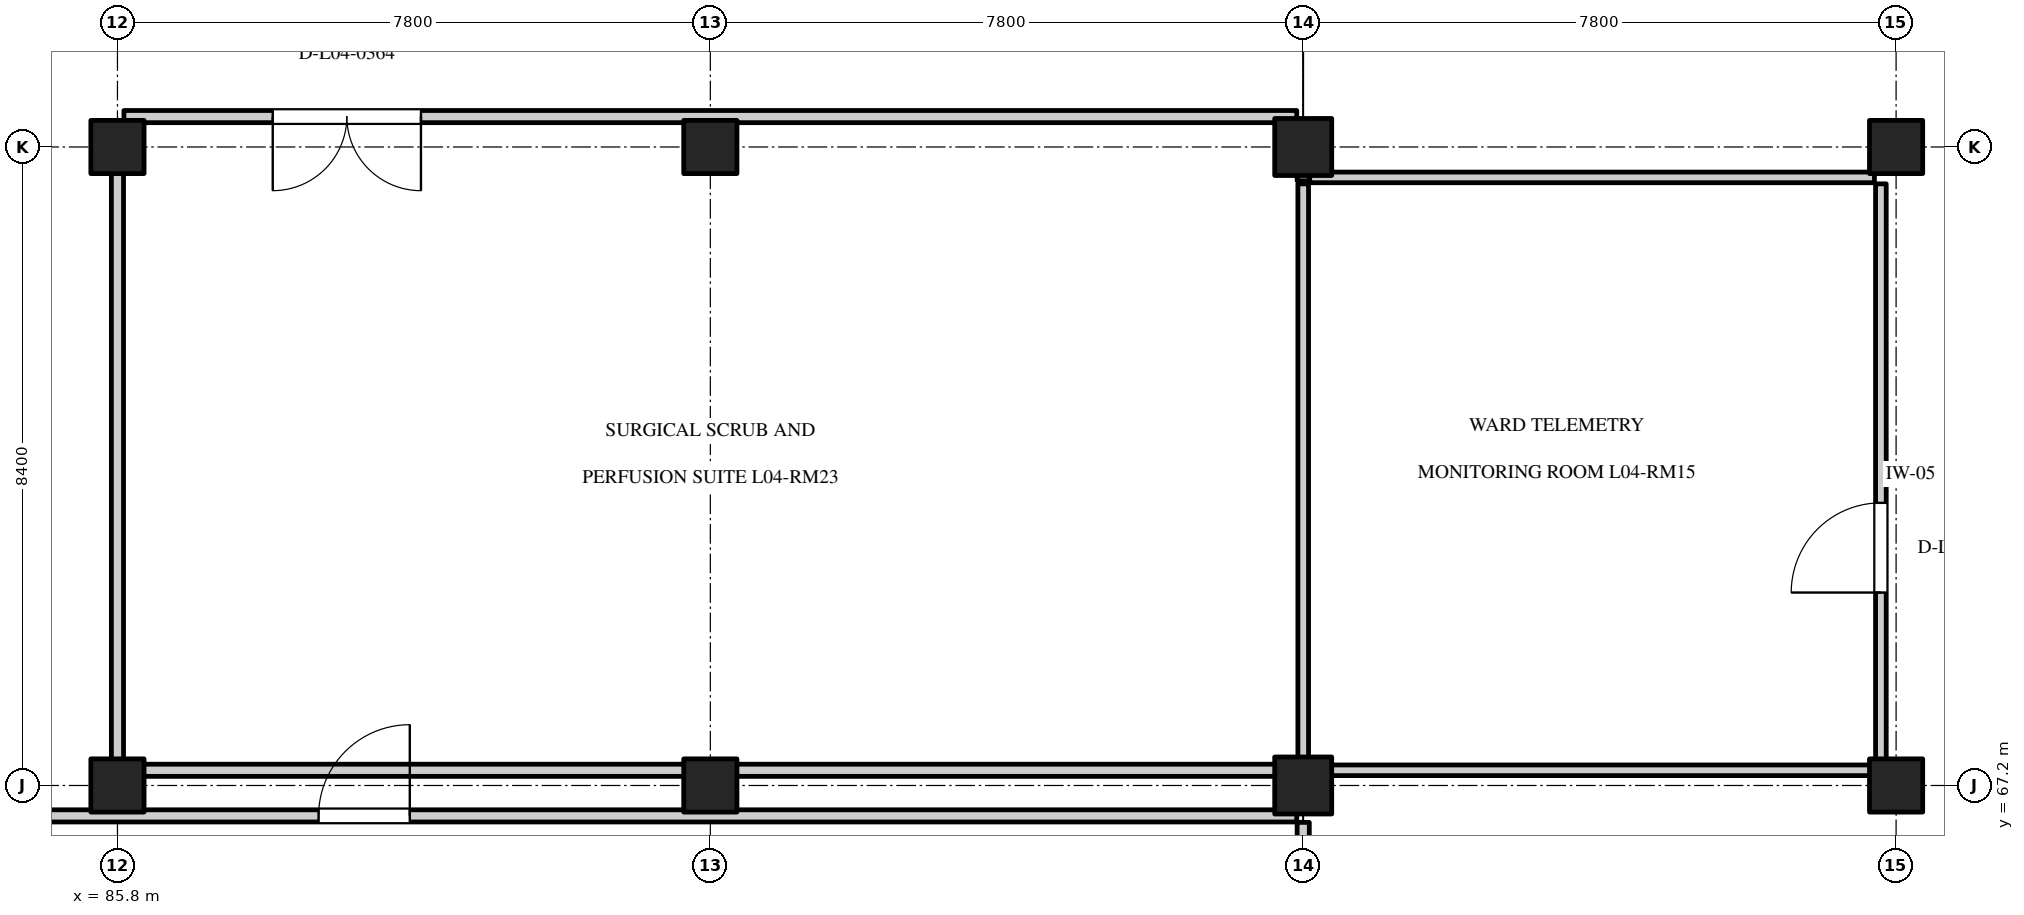
"""IFC4 building model, lengths in metres.
Left out: names, types, materials, properties, quantities, classifications, styles, units other than length and angle.
Written with IfcOpenShell. Run it as: python <this file> out.ifc"""

import sys

from ifc_helpers import new_model, si_unit, direction, frame, frame_2d, origin, origin_2d, place, context, subcontext, project, spatial, rectangle, extrude, element, fill, save


model = new_model("IFC4")
c1 = context("Model", 3, precision=1e-05, world=origin(), true_north=direction((0.0, 1.0)))
c2 = subcontext(c1, "Body", "Model", "MODEL_VIEW")
j1 = project(units=[si_unit("LENGTHUNIT", "METRE"), si_unit("PLANEANGLEUNIT", "RADIAN")], contexts=[c1])
p1 = place(None, origin())
s1 = spatial("IfcSite", under=j1, at=p1, CompositionType="ELEMENT")
p2 = place(p1, origin())
s2 = spatial("IfcBuilding", under=s1, at=p2, CompositionType="ELEMENT")
p3 = place(p2, frame((0.0, 0.0, 18.0)))
s3 = spatial("IfcBuildingStorey", under=s2, at=p3, CompositionType="ELEMENT", Elevation=18.0)
for number, where, z_axis, x_axis in (
    (1, (85.8, 67.2, 0.0), (0.0, 0.0, 1.0), (1.0, 0.0, 0.0)),
    (2, (85.8, 75.6, 0.0), (0.0, 0.0, 1.0), (1.0, 0.0, 0.0)),
    (3, (93.6, 67.2, 0.0), (0.0, 0.0, 1.0), (1.0, 0.0, 0.0)),
    (4, (93.6, 75.6, 0.0), (0.0, 0.0, 1.0), (1.0, 0.0, 0.0)),
):
    element("IfcColumn", number, at=place(p3, frame(where, z_axis=z_axis, x_axis=x_axis)), inside=s3, PredefinedType="COLUMN", context=c2, shape_type="SweptSolid", body=[
        extrude(rectangle(XDim=0.7, YDim=0.7, at=origin_2d()), origin(), (0.0, 0.0, 1.0), 4.2),
    ])
for number, where, z_axis, x_axis in (
    (5, (101.4, 67.2, 0.0), (0.0, 0.0, 1.0), (1.0, 0.0, 0.0)),
    (6, (101.4, 75.6, 0.0), (0.0, 0.0, 1.0), (1.0, 0.0, 0.0)),
):
    element("IfcColumn", number, at=place(p3, frame(where, z_axis=z_axis, x_axis=x_axis)), inside=s3, PredefinedType="COLUMN", context=c2, shape_type="SweptSolid", body=[
        extrude(rectangle(XDim=0.75, YDim=0.75, at=origin_2d()), origin(), (0.0, 0.0, 1.0), 4.2),
    ])
for number, where, z_axis, x_axis in (
    (7, (109.2, 67.2, 0.0), (0.0, 0.0, 1.0), (1.0, 0.0, 0.0)),
    (8, (109.2, 75.6, 0.0), (0.0, 0.0, 1.0), (1.0, 0.0, 0.0)),
):
    element("IfcColumn", number, at=place(p3, frame(where, z_axis=z_axis, x_axis=x_axis)), inside=s3, PredefinedType="COLUMN", context=c2, shape_type="SweptSolid", body=[
        extrude(rectangle(XDim=0.7, YDim=0.7, at=origin_2d()), origin(), (0.0, 0.0, 1.0), 4.2),
    ])
p4 = place(p3, frame((109.0, 67.485, 0.0), z_axis=(0.0, 0.0, 1.0), x_axis=(0.0, 1.0, 0.0)))
e9 = element("IfcWall", 9, at=p4, inside=s3, PredefinedType="PARTITIONING", context=c2, shape_type="SweptSolid", body=[
    extrude(rectangle(XDim=7.63, YDim=0.14, at=frame_2d((3.815, 0.0))), origin(), (0.0, 0.0, 1.0), 3.865),
])
p5 = place(p4, frame((2.253, 0.0, 0.0)))
e10 = element("IfcOpeningElement", 10, at=p5, cuts=e9, PredefinedType="OPENING", context=c2, shape_type="SweptSolid", body=[
    extrude(rectangle(XDim=1.18, YDim=2.2, at=frame_2d((0.59, 1.1))), frame((0.0, 0.082, 0.0), z_axis=(0.0, -1.0, 0.0), x_axis=(1.0, 0.0, 0.0)), (0.0, 0.0, 1.0), 0.164),
])
p6 = place(p3, frame((101.485, 67.4, 0.0), z_axis=(0.0, 0.0, 1.0), x_axis=(1.0, 0.0, 0.0)))
e11 = element("IfcWall", 11, at=p6, inside=s3, PredefinedType="PARTITIONING", context=c2, shape_type="SweptSolid", body=[
    extrude(rectangle(XDim=7.43, YDim=0.14, at=frame_2d((3.715, 0.0))), origin(), (0.0, 0.0, 1.0), 3.865),
])
p7 = place(p3, frame((101.485, 75.2, 0.0), z_axis=(0.0, 0.0, 1.0), x_axis=(1.0, 0.0, 0.0)))
e12 = element("IfcWall", 12, at=p7, inside=s3, PredefinedType="PARTITIONING", context=c2, shape_type="SweptSolid", body=[
    extrude(rectangle(XDim=7.43, YDim=0.14, at=frame_2d((3.715, 0.0))), origin(), (0.0, 0.0, 1.0), 3.385),
])
p8 = place(p3, frame((101.4, 67.485, 0.0), z_axis=(0.0, 0.0, 1.0), x_axis=(0.0, 1.0, 0.0)))
e13 = element("IfcWall", 13, at=p8, inside=s3, PredefinedType="PARTITIONING", context=c2, shape_type="SweptSolid", body=[
    extrude(rectangle(XDim=7.63, YDim=0.14, at=frame_2d((3.815, 0.0))), origin(), (0.0, 0.0, 1.0), 3.235),
])
p9 = place(p3, frame((85.885, 76.0, 0.0), z_axis=(0.0, 0.0, 1.0), x_axis=(1.0, 0.0, 0.0)))
e14 = element("IfcWall", 14, at=p9, inside=s3, PredefinedType="PARTITIONING", context=c2, shape_type="SweptSolid", body=[
    extrude(rectangle(XDim=15.43, YDim=0.16, at=frame_2d((7.715, 0.0))), origin(), (0.0, 0.0, 1.0), 3.385),
])
p10 = place(p9, frame((1.958, 0.0, 0.0)))
e15 = element("IfcOpeningElement", 15, at=p10, cuts=e14, PredefinedType="OPENING", context=c2, shape_type="SweptSolid", body=[
    extrude(rectangle(XDim=1.95, YDim=2.35, at=frame_2d((0.975, 1.175))), frame((0.0, 0.092, 0.0), z_axis=(0.0, -1.0, 0.0), x_axis=(1.0, 0.0, 0.0)), (0.0, 0.0, 1.0), 0.184),
])
p11 = place(p3, frame((85.885, 67.4, 0.0), z_axis=(0.0, 0.0, 1.0), x_axis=(1.0, 0.0, 0.0)))
e16 = element("IfcWall", 16, at=p11, inside=s3, PredefinedType="PARTITIONING", context=c2, shape_type="SweptSolid", body=[
    extrude(rectangle(XDim=15.43, YDim=0.16, at=frame_2d((7.715, 0.0))), origin(), (0.0, 0.0, 1.0), 3.865),
])
p12 = place(p3, frame((85.8, 67.485, 0.0), z_axis=(0.0, 0.0, 1.0), x_axis=(0.0, 1.0, 0.0)))
e17 = element("IfcWall", 17, at=p12, inside=s3, PredefinedType="PARTITIONING", context=c2, shape_type="SweptSolid", body=[
    extrude(rectangle(XDim=8.43, YDim=0.16, at=frame_2d((4.215, 0.0))), origin(), (0.0, 0.0, 1.0), 3.865),
])
p13 = place(p3, frame((101.4, 75.155, 0.0), z_axis=(0.0, 0.0, 1.0), x_axis=(0.0, 1.0, 0.0)))
e18 = element("IfcWall", 18, at=p13, inside=s3, PredefinedType="PARTITIONING", context=c2, shape_type="SweptSolid", body=[
    extrude(rectangle(XDim=0.76, YDim=0.16, at=frame_2d((0.38, 0.0))), origin(), (0.0, 0.0, 1.0), 3.235),
])
p14 = place(p3, frame((76.085, 66.8, 0.0), z_axis=(0.0, 0.0, 1.0), x_axis=(1.0, 0.0, 0.0)))
e19 = element("IfcWall", 19, at=p14, inside=s3, PredefinedType="PARTITIONING", context=c2, shape_type="SweptSolid", body=[
    extrude(rectangle(XDim=25.23, YDim=0.16, at=frame_2d((12.615, 0.0))), origin(), (0.0, 0.0, 1.0), 3.865),
])
p15 = place(p14, frame((12.361, 0.0, 0.0)))
e20 = element("IfcOpeningElement", 20, at=p15, cuts=e19, PredefinedType="OPENING", context=c2, shape_type="SweptSolid", body=[
    extrude(rectangle(XDim=1.2, YDim=2.15, at=frame_2d((0.6, 1.075))), frame((0.0, 0.092, 0.0), z_axis=(0.0, -1.0, 0.0), x_axis=(1.0, 0.0, 0.0)), (0.0, 0.0, 1.0), 0.184),
])
p16 = place(p3, frame((101.4, 58.885, 0.0), z_axis=(0.0, 0.0, 1.0), x_axis=(0.0, 1.0, 0.0)))
e21 = element("IfcWall", 21, at=p16, inside=s3, PredefinedType="PARTITIONING", context=c2, shape_type="SweptSolid", body=[
    extrude(rectangle(XDim=7.83, YDim=0.16, at=frame_2d((3.915, 0.0))), origin(), (0.0, 0.0, 1.0), 3.235),
])
p17 = place(p5, origin())
e22 = element("IfcDoor", 22, at=p17, inside=s3, OperationType="SINGLE_SWING_LEFT", PredefinedType="DOOR", context=c2, shape_type="SweptSolid", body=[
    extrude(rectangle(XDim=1.18, YDim=2.2, at=frame_2d((0.59, 1.1))), frame((0.0, 0.025, 0.0), z_axis=(0.0, -1.0, 0.0), x_axis=(1.0, 0.0, 0.0)), (0.0, 0.0, 1.0), 0.05),
])
fill(e10, e22)
p18 = place(p10, frame((1.95, 0.0, 0.0), z_axis=(0.0, 0.0, 1.0), x_axis=(-1.0, 0.0, 0.0)))
e23 = element("IfcDoor", 23, at=p18, inside=s3, OperationType="DOUBLE_DOOR_SINGLE_SWING", PredefinedType="DOOR", context=c2, shape_type="SweptSolid", body=[
    extrude(rectangle(XDim=1.95, YDim=2.35, at=frame_2d((0.975, 1.175))), frame((0.0, 0.025, 0.0), z_axis=(0.0, -1.0, 0.0), x_axis=(1.0, 0.0, 0.0)), (0.0, 0.0, 1.0), 0.05),
])
fill(e15, e23)
p19 = place(p15, frame((1.2, 0.0, 0.0), z_axis=(0.0, 0.0, 1.0), x_axis=(-1.0, 0.0, 0.0)))
e24 = element("IfcDoor", 24, at=p19, inside=s3, OperationType="SINGLE_SWING_LEFT", PredefinedType="DOOR", context=c2, shape_type="SweptSolid", body=[
    extrude(rectangle(XDim=1.2, YDim=2.15, at=frame_2d((0.6, 1.075))), frame((0.0, 0.025, 0.0), z_axis=(0.0, -1.0, 0.0), x_axis=(1.0, 0.0, 0.0)), (0.0, 0.0, 1.0), 0.05),
])
fill(e20, e24)
save(model, sys.argv[1])
